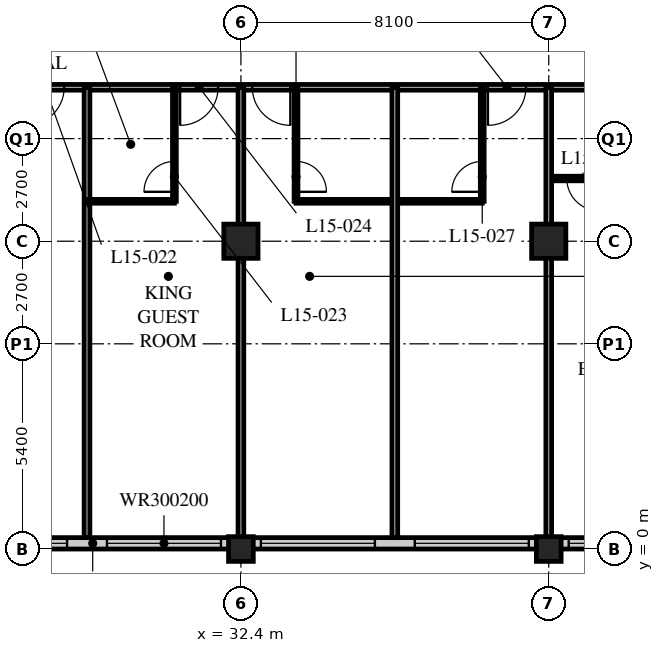
"""IFC4 building model, lengths in metres.
Left out: names, types, materials, properties, quantities, classifications, styles, units other than length and angle.
Written with IfcOpenShell. Run it as: python <this file> out.ifc"""

import sys

from ifc_helpers import new_model, si_unit, direction, frame, frame_2d, origin, origin_2d, place, context, subcontext, project, spatial, rectangle, hollow_rectangle, extrude, element, fill, save


model = new_model("IFC4")
c1 = context("Model", 3, precision=1e-05, world=origin(), true_north=direction((0.0, 1.0)))
c2 = subcontext(c1, "Body", "Model", "MODEL_VIEW")
j1 = project(units=[si_unit("LENGTHUNIT", "METRE"), si_unit("PLANEANGLEUNIT", "RADIAN")], contexts=[c1])
p1 = place(None, origin())
s1 = spatial("IfcSite", under=j1, at=p1, CompositionType="ELEMENT")
p2 = place(p1, origin())
s2 = spatial("IfcBuilding", under=s1, at=p2, CompositionType="ELEMENT")
p3 = place(p2, frame((0.0, 0.0, 63.6)))
s3 = spatial("IfcBuildingStorey", under=s2, at=p3, CompositionType="ELEMENT", Elevation=63.6)
p4 = place(p3, frame((32.4, 0.0, 0.0), z_axis=(0.0, 0.0, 1.0), x_axis=(1.0, 0.0, 0.0)))
e1 = element("IfcColumn", 1, at=p4, inside=s3, PredefinedType="COLUMN", context=c2, shape_type="SweptSolid", body=[
    extrude(hollow_rectangle(XDim=0.65, YDim=0.65, WallThickness=0.05, at=origin_2d()), origin(), (0.0, 0.0, 1.0), 3.4),
])
p5 = place(p3, frame((32.4, 8.1, 0.0), z_axis=(0.0, 0.0, 1.0), x_axis=(1.0, 0.0, 0.0)))
e2 = element("IfcColumn", 2, at=p5, inside=s3, PredefinedType="COLUMN", context=c2, shape_type="SweptSolid", body=[
    extrude(hollow_rectangle(XDim=0.9, YDim=0.9, WallThickness=0.09, at=origin_2d()), origin(), (0.0, 0.0, 1.0), 3.4),
])
p6 = place(p3, frame((40.5, 0.0, 0.0), z_axis=(0.0, 0.0, 1.0), x_axis=(1.0, 0.0, 0.0)))
e3 = element("IfcColumn", 3, at=p6, inside=s3, PredefinedType="COLUMN", context=c2, shape_type="SweptSolid", body=[
    extrude(hollow_rectangle(XDim=0.65, YDim=0.65, WallThickness=0.05, at=origin_2d()), origin(), (0.0, 0.0, 1.0), 3.4),
])
p7 = place(p3, frame((40.5, 8.1, 0.0), z_axis=(0.0, 0.0, 1.0), x_axis=(1.0, 0.0, 0.0)))
e4 = element("IfcColumn", 4, at=p7, inside=s3, PredefinedType="COLUMN", context=c2, shape_type="SweptSolid", body=[
    extrude(hollow_rectangle(XDim=0.9, YDim=0.9, WallThickness=0.09, at=origin_2d()), origin(), (0.0, 0.0, 1.0), 3.4),
])
p8 = place(p3, frame((8.4, 0.15, 0.0), z_axis=(0.0, 0.0, 1.0), x_axis=(1.0, 0.0, 0.0)))
e5 = element("IfcWall", 5, at=p8, inside=s3, PredefinedType="SOLIDWALL", context=c2, shape_type="SweptSolid", body=[
    extrude(rectangle(XDim=40.2, YDim=0.3, at=frame_2d((20.1, 0.0))), origin(), (0.0, 0.0, 1.0), 3.19),
])
p9 = place(p8, frame((0.225, 0.0, 0.9)))
e6 = element("IfcOpeningElement", 6, at=p9, cuts=e5, PredefinedType="OPENING", context=c2, shape_type="SweptSolid", body=[
    extrude(rectangle(XDim=3.0, YDim=2.0, at=frame_2d((1.5, 1.0))), frame((0.0, 0.16, 0.0), z_axis=(0.0, -1.0, 0.0), x_axis=(1.0, 0.0, 0.0)), (0.0, 0.0, 1.0), 0.32),
])
p10 = place(p8, frame((4.275, 0.0, 0.9)))
e7 = element("IfcOpeningElement", 7, at=p10, cuts=e5, PredefinedType="OPENING", context=c2, shape_type="SweptSolid", body=[
    extrude(rectangle(XDim=3.0, YDim=2.0, at=frame_2d((1.5, 1.0))), frame((0.0, 0.16, 0.0), z_axis=(0.0, -1.0, 0.0), x_axis=(1.0, 0.0, 0.0)), (0.0, 0.0, 1.0), 0.32),
])
p11 = place(p8, frame((8.325, 0.0, 0.9)))
e8 = element("IfcOpeningElement", 8, at=p11, cuts=e5, PredefinedType="OPENING", context=c2, shape_type="SweptSolid", body=[
    extrude(rectangle(XDim=3.0, YDim=2.0, at=frame_2d((1.5, 1.0))), frame((0.0, 0.16, 0.0), z_axis=(0.0, -1.0, 0.0), x_axis=(1.0, 0.0, 0.0)), (0.0, 0.0, 1.0), 0.32),
])
p12 = place(p8, frame((12.375, 0.0, 0.9)))
e9 = element("IfcOpeningElement", 9, at=p12, cuts=e5, PredefinedType="OPENING", context=c2, shape_type="SweptSolid", body=[
    extrude(rectangle(XDim=3.0, YDim=2.0, at=frame_2d((1.5, 1.0))), frame((0.0, 0.16, 0.0), z_axis=(0.0, -1.0, 0.0), x_axis=(1.0, 0.0, 0.0)), (0.0, 0.0, 1.0), 0.32),
])
p13 = place(p8, frame((16.425, 0.0, 0.9)))
e10 = element("IfcOpeningElement", 10, at=p13, cuts=e5, PredefinedType="OPENING", context=c2, shape_type="SweptSolid", body=[
    extrude(rectangle(XDim=3.0, YDim=2.0, at=frame_2d((1.5, 1.0))), frame((0.0, 0.16, 0.0), z_axis=(0.0, -1.0, 0.0), x_axis=(1.0, 0.0, 0.0)), (0.0, 0.0, 1.0), 0.32),
])
p14 = place(p8, frame((20.475, 0.0, 0.9)))
e11 = element("IfcOpeningElement", 11, at=p14, cuts=e5, PredefinedType="OPENING", context=c2, shape_type="SweptSolid", body=[
    extrude(rectangle(XDim=3.0, YDim=2.0, at=frame_2d((1.5, 1.0))), frame((0.0, 0.16, 0.0), z_axis=(0.0, -1.0, 0.0), x_axis=(1.0, 0.0, 0.0)), (0.0, 0.0, 1.0), 0.32),
])
p15 = place(p8, frame((24.525, 0.0, 0.9)))
e12 = element("IfcOpeningElement", 12, at=p15, cuts=e5, PredefinedType="OPENING", context=c2, shape_type="SweptSolid", body=[
    extrude(rectangle(XDim=3.0, YDim=2.0, at=frame_2d((1.5, 1.0))), frame((0.0, 0.16, 0.0), z_axis=(0.0, -1.0, 0.0), x_axis=(1.0, 0.0, 0.0)), (0.0, 0.0, 1.0), 0.32),
])
p16 = place(p8, frame((28.575, 0.0, 0.9)))
e13 = element("IfcOpeningElement", 13, at=p16, cuts=e5, PredefinedType="OPENING", context=c2, shape_type="SweptSolid", body=[
    extrude(rectangle(XDim=3.0, YDim=2.0, at=frame_2d((1.5, 1.0))), frame((0.0, 0.16, 0.0), z_axis=(0.0, -1.0, 0.0), x_axis=(1.0, 0.0, 0.0)), (0.0, 0.0, 1.0), 0.32),
])
p17 = place(p8, frame((32.625, 0.0, 0.9)))
e14 = element("IfcOpeningElement", 14, at=p17, cuts=e5, PredefinedType="OPENING", context=c2, shape_type="SweptSolid", body=[
    extrude(rectangle(XDim=3.0, YDim=2.0, at=frame_2d((1.5, 1.0))), frame((0.0, 0.16, 0.0), z_axis=(0.0, -1.0, 0.0), x_axis=(1.0, 0.0, 0.0)), (0.0, 0.0, 1.0), 0.32),
])
p18 = place(p8, frame((36.675, 0.0, 0.9)))
e15 = element("IfcOpeningElement", 15, at=p18, cuts=e5, PredefinedType="OPENING", context=c2, shape_type="SweptSolid", body=[
    extrude(rectangle(XDim=3.0, YDim=2.0, at=frame_2d((1.5, 1.0))), frame((0.0, 0.16, 0.0), z_axis=(0.0, -1.0, 0.0), x_axis=(1.0, 0.0, 0.0)), (0.0, 0.0, 1.0), 0.32),
])
p19 = place(p3, frame((8.1, 12.15, 0.0), z_axis=(0.0, 0.0, 1.0), x_axis=(1.0, 0.0, 0.0)))
e16 = element("IfcWall", 16, at=p19, inside=s3, PredefinedType="PARTITIONING", context=c2, shape_type="SweptSolid", body=[
    extrude(rectangle(XDim=36.45, YDim=0.15, at=frame_2d((18.225, 0.0))), origin(), (0.0, 0.0, 1.0), 3.19),
])
p20 = place(p19, frame((4.35, 0.0, 0.0)))
e17 = element("IfcOpeningElement", 17, at=p20, cuts=e16, PredefinedType="OPENING", context=c2, shape_type="SweptSolid", body=[
    extrude(rectangle(XDim=1.0, YDim=2.1, at=frame_2d((0.5, 1.05))), frame((0.0, 0.085, 0.0), z_axis=(0.0, -1.0, 0.0), x_axis=(1.0, 0.0, 0.0)), (0.0, 0.0, 1.0), 0.17),
])
p21 = place(p19, frame((10.55, 0.0, 0.0)))
e18 = element("IfcOpeningElement", 18, at=p21, cuts=e16, PredefinedType="OPENING", context=c2, shape_type="SweptSolid", body=[
    extrude(rectangle(XDim=1.0, YDim=2.1, at=frame_2d((0.5, 1.05))), frame((0.0, 0.085, 0.0), z_axis=(0.0, -1.0, 0.0), x_axis=(1.0, 0.0, 0.0)), (0.0, 0.0, 1.0), 0.17),
])
p22 = place(p19, frame((14.6, 0.0, 0.0)))
e19 = element("IfcOpeningElement", 19, at=p22, cuts=e16, PredefinedType="OPENING", context=c2, shape_type="SweptSolid", body=[
    extrude(rectangle(XDim=1.0, YDim=2.1, at=frame_2d((0.5, 1.05))), frame((0.0, 0.085, 0.0), z_axis=(0.0, -1.0, 0.0), x_axis=(1.0, 0.0, 0.0)), (0.0, 0.0, 1.0), 0.17),
])
p23 = place(p19, frame((18.65, 0.0, 0.0)))
e20 = element("IfcOpeningElement", 20, at=p23, cuts=e16, PredefinedType="OPENING", context=c2, shape_type="SweptSolid", body=[
    extrude(rectangle(XDim=1.0, YDim=2.1, at=frame_2d((0.5, 1.05))), frame((0.0, 0.085, 0.0), z_axis=(0.0, -1.0, 0.0), x_axis=(1.0, 0.0, 0.0)), (0.0, 0.0, 1.0), 0.17),
])
p24 = place(p19, frame((22.7, 0.0, 0.0)))
e21 = element("IfcOpeningElement", 21, at=p24, cuts=e16, PredefinedType="OPENING", context=c2, shape_type="SweptSolid", body=[
    extrude(rectangle(XDim=1.0, YDim=2.1, at=frame_2d((0.5, 1.05))), frame((0.0, 0.085, 0.0), z_axis=(0.0, -1.0, 0.0), x_axis=(1.0, 0.0, 0.0)), (0.0, 0.0, 1.0), 0.17),
])
p25 = place(p19, frame((24.6, 0.0, 0.0)))
e22 = element("IfcOpeningElement", 22, at=p25, cuts=e16, PredefinedType="OPENING", context=c2, shape_type="SweptSolid", body=[
    extrude(rectangle(XDim=1.0, YDim=2.1, at=frame_2d((0.5, 1.05))), frame((0.0, 0.085, 0.0), z_axis=(0.0, -1.0, 0.0), x_axis=(1.0, 0.0, 0.0)), (0.0, 0.0, 1.0), 0.17),
])
p26 = place(p19, frame((30.8, 0.0, 0.0)))
e23 = element("IfcOpeningElement", 23, at=p26, cuts=e16, PredefinedType="OPENING", context=c2, shape_type="SweptSolid", body=[
    extrude(rectangle(XDim=1.0, YDim=2.1, at=frame_2d((0.5, 1.05))), frame((0.0, 0.085, 0.0), z_axis=(0.0, -1.0, 0.0), x_axis=(1.0, 0.0, 0.0)), (0.0, 0.0, 1.0), 0.17),
])
p27 = place(p19, frame((1.525, 0.0, 0.0)))
e24 = element("IfcOpeningElement", 24, at=p27, cuts=e16, PredefinedType="OPENING", context=c2, shape_type="SweptSolid", body=[
    extrude(rectangle(XDim=1.0, YDim=2.1, at=frame_2d((0.5, 1.05))), frame((0.0, 0.085, 0.0), z_axis=(0.0, -1.0, 0.0), x_axis=(1.0, 0.0, 0.0)), (0.0, 0.0, 1.0), 0.17),
])
p28 = place(p19, frame((33.925, 0.0, 0.0)))
e25 = element("IfcOpeningElement", 25, at=p28, cuts=e16, PredefinedType="OPENING", context=c2, shape_type="SweptSolid", body=[
    extrude(rectangle(XDim=1.0, YDim=2.1, at=frame_2d((0.5, 1.05))), frame((0.0, 0.085, 0.0), z_axis=(0.0, -1.0, 0.0), x_axis=(1.0, 0.0, 0.0)), (0.0, 0.0, 1.0), 0.17),
])
p29 = place(p3, frame((28.35, 12.15, 0.0), z_axis=(0.0, 0.0, 1.0), x_axis=(0.0, -1.0, 0.0)))
e26 = element("IfcWall", 26, at=p29, inside=s3, PredefinedType="PARTITIONING", context=c2, shape_type="SweptSolid", body=[
    extrude(rectangle(XDim=11.85, YDim=0.15, at=frame_2d((5.925, 0.0))), origin(), (0.0, 0.0, 1.0), 3.19),
])
p30 = place(p3, frame((28.35, 9.15, 0.0), z_axis=(0.0, 0.0, 1.0), x_axis=(1.0, 0.0, 0.0)))
e27 = element("IfcWall", 27, at=p30, inside=s3, PredefinedType="PARTITIONING", context=c2, shape_type="SweptSolid", body=[
    extrude(rectangle(XDim=2.3, YDim=0.1, at=frame_2d((1.15, 0.0))), origin(), (0.0, 0.0, 1.0), 3.19),
])
p31 = place(p3, frame((30.65, 12.15, 0.0), z_axis=(0.0, 0.0, 1.0), x_axis=(0.0, -1.0, 0.0)))
e28 = element("IfcWall", 28, at=p31, inside=s3, PredefinedType="PARTITIONING", context=c2, shape_type="SweptSolid", body=[
    extrude(rectangle(XDim=3.0, YDim=0.1, at=frame_2d((1.5, 0.0))), origin(), (0.0, 0.0, 1.0), 3.19),
])
p32 = place(p31, frame((1.95, 0.0, 0.0)))
e29 = element("IfcOpeningElement", 29, at=p32, cuts=e28, PredefinedType="OPENING", context=c2, shape_type="SweptSolid", body=[
    extrude(rectangle(XDim=0.8, YDim=2.1, at=frame_2d((0.4, 1.05))), frame((0.0, 0.06, 0.0), z_axis=(0.0, -1.0, 0.0), x_axis=(1.0, 0.0, 0.0)), (0.0, 0.0, 1.0), 0.12),
])
p33 = place(p3, frame((32.4, 12.15, 0.0), z_axis=(0.0, 0.0, 1.0), x_axis=(0.0, -1.0, 0.0)))
e30 = element("IfcWall", 30, at=p33, inside=s3, PredefinedType="PARTITIONING", context=c2, shape_type="SweptSolid", body=[
    extrude(rectangle(XDim=11.85, YDim=0.15, at=frame_2d((5.925, 0.0))), origin(), (0.0, 0.0, 1.0), 2.578),
])
p34 = place(p3, frame((33.85, 9.15, 0.0), z_axis=(0.0, 0.0, 1.0), x_axis=(1.0, 0.0, 0.0)))
e31 = element("IfcWall", 31, at=p34, inside=s3, PredefinedType="PARTITIONING", context=c2, shape_type="SweptSolid", body=[
    extrude(rectangle(XDim=4.9, YDim=0.1, at=frame_2d((2.45, 0.0))), origin(), (0.0, 0.0, 1.0), 3.19),
])
p35 = place(p3, frame((33.85, 12.15, 0.0), z_axis=(0.0, 0.0, 1.0), x_axis=(0.0, -1.0, 0.0)))
e32 = element("IfcWall", 32, at=p35, inside=s3, PredefinedType="PARTITIONING", context=c2, shape_type="SweptSolid", body=[
    extrude(rectangle(XDim=3.0, YDim=0.1, at=frame_2d((1.5, 0.0))), origin(), (0.0, 0.0, 1.0), 3.19),
])
p36 = place(p35, frame((1.95, 0.0, 0.0)))
e33 = element("IfcOpeningElement", 33, at=p36, cuts=e32, PredefinedType="OPENING", context=c2, shape_type="SweptSolid", body=[
    extrude(rectangle(XDim=0.8, YDim=2.1, at=frame_2d((0.4, 1.05))), frame((0.0, 0.06, 0.0), z_axis=(0.0, -1.0, 0.0), x_axis=(1.0, 0.0, 0.0)), (0.0, 0.0, 1.0), 0.12),
])
p37 = place(p3, frame((36.45, 12.15, 0.0), z_axis=(0.0, 0.0, 1.0), x_axis=(0.0, -1.0, 0.0)))
e34 = element("IfcWall", 34, at=p37, inside=s3, PredefinedType="PARTITIONING", context=c2, shape_type="SweptSolid", body=[
    extrude(rectangle(XDim=11.85, YDim=0.15, at=frame_2d((5.925, 0.0))), origin(), (0.0, 0.0, 1.0), 3.19),
])
p38 = place(p3, frame((38.75, 12.15, 0.0), z_axis=(0.0, 0.0, 1.0), x_axis=(0.0, -1.0, 0.0)))
e35 = element("IfcWall", 35, at=p38, inside=s3, PredefinedType="PARTITIONING", context=c2, shape_type="SweptSolid", body=[
    extrude(rectangle(XDim=3.0, YDim=0.1, at=frame_2d((1.5, 0.0))), origin(), (0.0, 0.0, 1.0), 3.19),
])
p39 = place(p38, frame((1.95, 0.0, 0.0)))
e36 = element("IfcOpeningElement", 36, at=p39, cuts=e35, PredefinedType="OPENING", context=c2, shape_type="SweptSolid", body=[
    extrude(rectangle(XDim=0.8, YDim=2.1, at=frame_2d((0.4, 1.05))), frame((0.0, 0.06, 0.0), z_axis=(0.0, -1.0, 0.0), x_axis=(1.0, 0.0, 0.0)), (0.0, 0.0, 1.0), 0.12),
])
p40 = place(p3, frame((40.5, 9.75, 0.0), z_axis=(0.0, 0.0, 1.0), x_axis=(1.0, 0.0, 0.0)))
e37 = element("IfcWall", 37, at=p40, inside=s3, PredefinedType="PARTITIONING", context=c2, shape_type="SweptSolid", body=[
    extrude(rectangle(XDim=8.05, YDim=0.12, at=frame_2d((4.025, 0.0))), origin(), (0.0, 0.0, 1.0), 3.19),
])
p41 = place(p40, frame((0.475, 0.0, 0.0)))
e38 = element("IfcOpeningElement", 38, at=p41, cuts=e37, PredefinedType="OPENING", context=c2, shape_type="SweptSolid", body=[
    extrude(rectangle(XDim=0.85, YDim=2.1, at=frame_2d((0.425, 1.05))), frame((0.0, 0.07, 0.0), z_axis=(0.0, -1.0, 0.0), x_axis=(1.0, 0.0, 0.0)), (0.0, 0.0, 1.0), 0.14),
])
p42 = place(p40, frame((4.325, 0.0, 0.0)))
e39 = element("IfcOpeningElement", 39, at=p42, cuts=e37, PredefinedType="OPENING", context=c2, shape_type="SweptSolid", body=[
    extrude(rectangle(XDim=0.85, YDim=2.1, at=frame_2d((0.425, 1.05))), frame((0.0, 0.07, 0.0), z_axis=(0.0, -1.0, 0.0), x_axis=(1.0, 0.0, 0.0)), (0.0, 0.0, 1.0), 0.14),
])
p43 = place(p3, frame((40.5, 12.15, 0.0), z_axis=(0.0, 0.0, 1.0), x_axis=(0.0, -1.0, 0.0)))
e40 = element("IfcWall", 40, at=p43, inside=s3, PredefinedType="PARTITIONING", context=c2, shape_type="SweptSolid", body=[
    extrude(rectangle(XDim=11.85, YDim=0.15, at=frame_2d((5.925, 0.0))), origin(), (0.0, 0.0, 1.0), 2.578),
])
p44 = place(p13, origin())
e41 = element("IfcWindow", 41, at=p44, inside=s3, PartitioningType="SINGLE_PANEL", PredefinedType="WINDOW", context=c2, shape_type="SweptSolid", body=[
    extrude(rectangle(XDim=3.0, YDim=2.0, at=frame_2d((1.5, 1.0))), frame((0.0, 0.03, 0.0), z_axis=(0.0, -1.0, 0.0), x_axis=(1.0, 0.0, 0.0)), (0.0, 0.0, 1.0), 0.06),
])
fill(e10, e41)
p45 = place(p14, origin())
e42 = element("IfcWindow", 42, at=p45, inside=s3, PartitioningType="SINGLE_PANEL", PredefinedType="WINDOW", context=c2, shape_type="SweptSolid", body=[
    extrude(rectangle(XDim=3.0, YDim=2.0, at=frame_2d((1.5, 1.0))), frame((0.0, 0.03, 0.0), z_axis=(0.0, -1.0, 0.0), x_axis=(1.0, 0.0, 0.0)), (0.0, 0.0, 1.0), 0.06),
])
fill(e11, e42)
p46 = place(p15, origin())
e43 = element("IfcWindow", 43, at=p46, inside=s3, PartitioningType="SINGLE_PANEL", PredefinedType="WINDOW", context=c2, shape_type="SweptSolid", body=[
    extrude(rectangle(XDim=3.0, YDim=2.0, at=frame_2d((1.5, 1.0))), frame((0.0, 0.03, 0.0), z_axis=(0.0, -1.0, 0.0), x_axis=(1.0, 0.0, 0.0)), (0.0, 0.0, 1.0), 0.06),
])
fill(e12, e43)
p47 = place(p16, origin())
e44 = element("IfcWindow", 44, at=p47, inside=s3, PartitioningType="SINGLE_PANEL", PredefinedType="WINDOW", context=c2, shape_type="SweptSolid", body=[
    extrude(rectangle(XDim=3.0, YDim=2.0, at=frame_2d((1.5, 1.0))), frame((0.0, 0.03, 0.0), z_axis=(0.0, -1.0, 0.0), x_axis=(1.0, 0.0, 0.0)), (0.0, 0.0, 1.0), 0.06),
])
fill(e13, e44)
p48 = place(p17, origin())
e45 = element("IfcWindow", 45, at=p48, inside=s3, PartitioningType="SINGLE_PANEL", PredefinedType="WINDOW", context=c2, shape_type="SweptSolid", body=[
    extrude(rectangle(XDim=3.0, YDim=2.0, at=frame_2d((1.5, 1.0))), frame((0.0, 0.03, 0.0), z_axis=(0.0, -1.0, 0.0), x_axis=(1.0, 0.0, 0.0)), (0.0, 0.0, 1.0), 0.06),
])
fill(e14, e45)
p49 = place(p23, origin())
e46 = element("IfcDoor", 46, at=p49, inside=s3, OperationType="SINGLE_SWING_RIGHT", PredefinedType="DOOR", context=c2, shape_type="SweptSolid", body=[
    extrude(rectangle(XDim=1.0, YDim=2.1, at=frame_2d((0.5, 1.05))), frame((0.0, 0.025, 0.0), z_axis=(0.0, -1.0, 0.0), x_axis=(1.0, 0.0, 0.0)), (0.0, 0.0, 1.0), 0.05),
])
fill(e20, e46)
p50 = place(p32, origin())
e47 = element("IfcDoor", 47, at=p50, inside=s3, OperationType="SINGLE_SWING_LEFT", PredefinedType="DOOR", context=c2, shape_type="SweptSolid", body=[
    extrude(rectangle(XDim=0.8, YDim=2.1, at=frame_2d((0.4, 1.05))), frame((0.0, 0.025, 0.0), z_axis=(0.0, -1.0, 0.0), x_axis=(1.0, 0.0, 0.0)), (0.0, 0.0, 1.0), 0.05),
])
fill(e29, e47)
p51 = place(p24, origin())
e48 = element("IfcDoor", 48, at=p51, inside=s3, OperationType="SINGLE_SWING_RIGHT", PredefinedType="DOOR", context=c2, shape_type="SweptSolid", body=[
    extrude(rectangle(XDim=1.0, YDim=2.1, at=frame_2d((0.5, 1.05))), frame((0.0, 0.025, 0.0), z_axis=(0.0, -1.0, 0.0), x_axis=(1.0, 0.0, 0.0)), (0.0, 0.0, 1.0), 0.05),
])
fill(e21, e48)
p52 = place(p36, origin())
e49 = element("IfcDoor", 49, at=p52, inside=s3, OperationType="SINGLE_SWING_RIGHT", PredefinedType="DOOR", context=c2, shape_type="SweptSolid", body=[
    extrude(rectangle(XDim=0.8, YDim=2.1, at=frame_2d((0.4, 1.05))), frame((0.0, 0.025, 0.0), z_axis=(0.0, -1.0, 0.0), x_axis=(1.0, 0.0, 0.0)), (0.0, 0.0, 1.0), 0.05),
])
fill(e33, e49)
p53 = place(p25, origin())
e50 = element("IfcDoor", 50, at=p53, inside=s3, OperationType="SINGLE_SWING_LEFT", PredefinedType="DOOR", context=c2, shape_type="SweptSolid", body=[
    extrude(rectangle(XDim=1.0, YDim=2.1, at=frame_2d((0.5, 1.05))), frame((0.0, 0.025, 0.0), z_axis=(0.0, -1.0, 0.0), x_axis=(1.0, 0.0, 0.0)), (0.0, 0.0, 1.0), 0.05),
])
fill(e22, e50)
p54 = place(p39, origin())
e51 = element("IfcDoor", 51, at=p54, inside=s3, OperationType="SINGLE_SWING_LEFT", PredefinedType="DOOR", context=c2, shape_type="SweptSolid", body=[
    extrude(rectangle(XDim=0.8, YDim=2.1, at=frame_2d((0.4, 1.05))), frame((0.0, 0.025, 0.0), z_axis=(0.0, -1.0, 0.0), x_axis=(1.0, 0.0, 0.0)), (0.0, 0.0, 1.0), 0.05),
])
fill(e36, e51)
p55 = place(p26, origin())
e52 = element("IfcDoor", 52, at=p55, inside=s3, OperationType="SINGLE_SWING_RIGHT", PredefinedType="DOOR", context=c2, shape_type="SweptSolid", body=[
    extrude(rectangle(XDim=1.0, YDim=2.1, at=frame_2d((0.5, 1.05))), frame((0.0, 0.025, 0.0), z_axis=(0.0, -1.0, 0.0), x_axis=(1.0, 0.0, 0.0)), (0.0, 0.0, 1.0), 0.05),
])
fill(e23, e52)
p56 = place(p41, origin())
e53 = element("IfcDoor", 53, at=p56, inside=s3, OperationType="SINGLE_SWING_LEFT", PredefinedType="DOOR", context=c2, shape_type="SweptSolid", body=[
    extrude(rectangle(XDim=0.85, YDim=2.1, at=frame_2d((0.425, 1.05))), frame((0.0, 0.025, 0.0), z_axis=(0.0, -1.0, 0.0), x_axis=(1.0, 0.0, 0.0)), (0.0, 0.0, 1.0), 0.05),
])
fill(e38, e53)
save(model, sys.argv[1])
